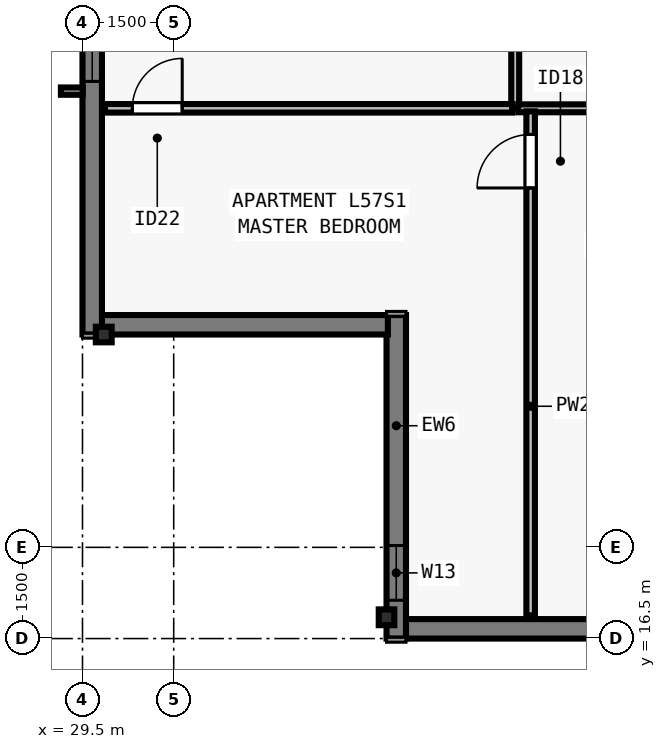
"""IFC4 building model, lengths in metres.
Left out: names, types, materials, properties, quantities, classifications, styles, units other than length and angle.
Written with IfcOpenShell. Run it as: python <this file> out.ifc"""

import sys

from ifc_helpers import new_model, si_unit, direction, frame, frame_2d, origin, origin_2d, place, context, subcontext, project, spatial, rectangle, i_section, extrude, element, fill, save


model = new_model("IFC4")
c1 = context("Model", 3, precision=1e-05, world=origin(), true_north=direction((0.0, 1.0)))
c2 = subcontext(c1, "Body", "Model", "MODEL_VIEW")
j1 = project(units=[si_unit("LENGTHUNIT", "METRE"), si_unit("PLANEANGLEUNIT", "RADIAN")], contexts=[c1])
p1 = place(None, origin())
s1 = spatial("IfcSite", under=j1, at=p1, CompositionType="ELEMENT")
p2 = place(p1, origin())
s2 = spatial("IfcBuilding", under=s1, at=p2, CompositionType="ELEMENT")
p3 = place(p2, frame((0.0, 0.0, 209.5)))
s3 = spatial("IfcBuildingStorey", under=s2, at=p3, CompositionType="ELEMENT", Elevation=209.5)
for number, where, z_axis, x_axis in (
    (1, (34.5, 16.85, 0.0), (0.0, 0.0, 1.0), (1.0, 0.0, 0.0)),
    (2, (29.85, 21.5, 0.0), (0.0, 0.0, 1.0), (0.0, 1.0, 0.0)),
):
    element("IfcColumn", number, at=place(p3, frame(where, z_axis=z_axis, x_axis=x_axis)), inside=s3, PredefinedType="COLUMN", context=c2, shape_type="SweptSolid", body=[
        extrude(i_section(OverallWidth=0.256, OverallDepth=0.26, WebThickness=0.01, FlangeThickness=0.017, FilletRadius=0.013, at=origin_2d()), origin(), (0.0, 0.0, 1.0), 3.5),
    ])
p4 = place(p3, frame((69.5, 16.66, 0.0), z_axis=(0.0, 0.0, 1.0), x_axis=(-1.0, 0.0, 0.0)))
e3 = element("IfcWall", 3, at=p4, inside=s3, PredefinedType="SOLIDWALL", context=c2, shape_type="SweptSolid", body=[
    extrude(rectangle(XDim=34.702, YDim=0.32, at=frame_2d((17.351, 0.0))), origin(), (0.0, 0.0, 1.0), 3.29),
])
p5 = place(p4, frame((5.863, 0.0, 0.8)))
e4 = element("IfcOpeningElement", 4, at=p5, cuts=e3, PredefinedType="OPENING", context=c2, shape_type="SweptSolid", body=[
    extrude(rectangle(XDim=1.85, YDim=1.678, at=frame_2d((0.925, 0.839))), frame((0.0, 0.17, 0.0), z_axis=(0.0, -1.0, 0.0), x_axis=(1.0, 0.0, 0.0)), (0.0, 0.0, 1.0), 0.34),
])
p6 = place(p4, frame((8.138, 0.0, 0.8)))
e5 = element("IfcOpeningElement", 5, at=p6, cuts=e3, PredefinedType="OPENING", context=c2, shape_type="SweptSolid", body=[
    extrude(rectangle(XDim=1.55, YDim=1.678, at=frame_2d((0.775, 0.839))), frame((0.0, 0.17, 0.0), z_axis=(0.0, -1.0, 0.0), x_axis=(1.0, 0.0, 0.0)), (0.0, 0.0, 1.0), 0.34),
])
p7 = place(p4, frame((10.113, 0.0, 0.8)))
e6 = element("IfcOpeningElement", 6, at=p7, cuts=e3, PredefinedType="OPENING", context=c2, shape_type="SweptSolid", body=[
    extrude(rectangle(XDim=1.85, YDim=1.678, at=frame_2d((0.925, 0.839))), frame((0.0, 0.17, 0.0), z_axis=(0.0, -1.0, 0.0), x_axis=(1.0, 0.0, 0.0)), (0.0, 0.0, 1.0), 0.34),
])
p8 = place(p4, frame((14.888, 0.0, 0.8)))
e7 = element("IfcOpeningElement", 7, at=p8, cuts=e3, PredefinedType="OPENING", context=c2, shape_type="SweptSolid", body=[
    extrude(rectangle(XDim=1.55, YDim=1.678, at=frame_2d((0.775, 0.839))), frame((0.0, 0.17, 0.0), z_axis=(0.0, -1.0, 0.0), x_axis=(1.0, 0.0, 0.0)), (0.0, 0.0, 1.0), 0.34),
])
p9 = place(p4, frame((18.564, 0.0, 0.8)))
e8 = element("IfcOpeningElement", 8, at=p9, cuts=e3, PredefinedType="OPENING", context=c2, shape_type="SweptSolid", body=[
    extrude(rectangle(XDim=1.85, YDim=1.678, at=frame_2d((0.925, 0.839))), frame((0.0, 0.17, 0.0), z_axis=(0.0, -1.0, 0.0), x_axis=(1.0, 0.0, 0.0)), (0.0, 0.0, 1.0), 0.34),
])
p10 = place(p4, frame((24.414, 0.0, 0.8)))
e9 = element("IfcOpeningElement", 9, at=p10, cuts=e3, PredefinedType="OPENING", context=c2, shape_type="SweptSolid", body=[
    extrude(rectangle(XDim=1.85, YDim=1.678, at=frame_2d((0.925, 0.839))), frame((0.0, 0.17, 0.0), z_axis=(0.0, -1.0, 0.0), x_axis=(1.0, 0.0, 0.0)), (0.0, 0.0, 1.0), 0.34),
])
p11 = place(p4, frame((28.389, 0.0, 0.8)))
e10 = element("IfcOpeningElement", 10, at=p11, cuts=e3, PredefinedType="OPENING", context=c2, shape_type="SweptSolid", body=[
    extrude(rectangle(XDim=1.55, YDim=1.678, at=frame_2d((0.775, 0.839))), frame((0.0, 0.17, 0.0), z_axis=(0.0, -1.0, 0.0), x_axis=(1.0, 0.0, 0.0)), (0.0, 0.0, 1.0), 0.34),
])
p12 = place(p3, frame((34.66, 16.5, 0.0), z_axis=(0.0, 0.0, 1.0), x_axis=(0.0, 1.0, 0.0)))
e11 = element("IfcWall", 11, at=p12, inside=s3, PredefinedType="SOLIDWALL", context=c2, shape_type="SweptSolid", body=[
    extrude(rectangle(XDim=5.32, YDim=0.32, at=frame_2d((2.66, 0.0))), origin(), (0.0, 0.0, 1.0), 3.29),
])
p13 = place(p12, frame((0.63, 0.0, 0.8)))
e12 = element("IfcOpeningElement", 12, at=p13, cuts=e11, PredefinedType="OPENING", context=c2, shape_type="SweptSolid", body=[
    extrude(rectangle(XDim=0.9, YDim=1.678, at=frame_2d((0.45, 0.839))), frame((0.0, 0.17, 0.0), z_axis=(0.0, -1.0, 0.0), x_axis=(1.0, 0.0, 0.0)), (0.0, 0.0, 1.0), 0.34),
])
p14 = place(p3, frame((34.522, 21.66, 0.0), z_axis=(0.0, 0.0, 1.0), x_axis=(-1.0, 0.0, 0.0)))
e13 = element("IfcWall", 13, at=p14, inside=s3, PredefinedType="SOLIDWALL", context=c2, shape_type="SweptSolid", body=[
    extrude(rectangle(XDim=4.724, YDim=0.32, at=frame_2d((2.362, 0.0))), origin(), (0.0, 0.0, 1.0), 3.29),
])
p15 = place(p3, frame((29.66, 21.5, 0.0), z_axis=(0.0, 0.0, 1.0), x_axis=(0.0, 1.0, 0.0)))
e14 = element("IfcWall", 14, at=p15, inside=s3, PredefinedType="SOLIDWALL", context=c2, shape_type="SweptSolid", body=[
    extrude(rectangle(XDim=34.702, YDim=0.32, at=frame_2d((17.351, 0.0))), origin(), (0.0, 0.0, 1.0), 3.29),
])
p16 = place(p15, frame((4.163, 0.0, 0.8)))
e15 = element("IfcOpeningElement", 15, at=p16, cuts=e14, PredefinedType="OPENING", context=c2, shape_type="SweptSolid", body=[
    extrude(rectangle(XDim=1.85, YDim=1.678, at=frame_2d((0.925, 0.839))), frame((0.0, 0.17, 0.0), z_axis=(0.0, -1.0, 0.0), x_axis=(1.0, 0.0, 0.0)), (0.0, 0.0, 1.0), 0.34),
])
p17 = place(p15, frame((6.888, 0.0, 0.8)))
e16 = element("IfcOpeningElement", 16, at=p17, cuts=e14, PredefinedType="OPENING", context=c2, shape_type="SweptSolid", body=[
    extrude(rectangle(XDim=1.55, YDim=1.678, at=frame_2d((0.775, 0.839))), frame((0.0, 0.17, 0.0), z_axis=(0.0, -1.0, 0.0), x_axis=(1.0, 0.0, 0.0)), (0.0, 0.0, 1.0), 0.34),
])
p18 = place(p15, frame((10.113, 0.0, 0.8)))
e17 = element("IfcOpeningElement", 17, at=p18, cuts=e14, PredefinedType="OPENING", context=c2, shape_type="SweptSolid", body=[
    extrude(rectangle(XDim=1.85, YDim=1.678, at=frame_2d((0.925, 0.839))), frame((0.0, 0.17, 0.0), z_axis=(0.0, -1.0, 0.0), x_axis=(1.0, 0.0, 0.0)), (0.0, 0.0, 1.0), 0.34),
])
p19 = place(p15, frame((14.888, 0.0, 0.8)))
e18 = element("IfcOpeningElement", 18, at=p19, cuts=e14, PredefinedType="OPENING", context=c2, shape_type="SweptSolid", body=[
    extrude(rectangle(XDim=1.55, YDim=1.678, at=frame_2d((0.775, 0.839))), frame((0.0, 0.17, 0.0), z_axis=(0.0, -1.0, 0.0), x_axis=(1.0, 0.0, 0.0)), (0.0, 0.0, 1.0), 0.34),
])
p20 = place(p15, frame((19.364, 0.0, 0.8)))
e19 = element("IfcOpeningElement", 19, at=p20, cuts=e14, PredefinedType="OPENING", context=c2, shape_type="SweptSolid", body=[
    extrude(rectangle(XDim=1.85, YDim=1.678, at=frame_2d((0.925, 0.839))), frame((0.0, 0.17, 0.0), z_axis=(0.0, -1.0, 0.0), x_axis=(1.0, 0.0, 0.0)), (0.0, 0.0, 1.0), 0.34),
])
p21 = place(p15, frame((23.614, 0.0, 0.8)))
e20 = element("IfcOpeningElement", 20, at=p21, cuts=e14, PredefinedType="OPENING", context=c2, shape_type="SweptSolid", body=[
    extrude(rectangle(XDim=1.85, YDim=1.678, at=frame_2d((0.925, 0.839))), frame((0.0, 0.17, 0.0), z_axis=(0.0, -1.0, 0.0), x_axis=(1.0, 0.0, 0.0)), (0.0, 0.0, 1.0), 0.34),
])
p22 = place(p15, frame((28.839, 0.0, 0.8)))
e21 = element("IfcOpeningElement", 21, at=p22, cuts=e14, PredefinedType="OPENING", context=c2, shape_type="SweptSolid", body=[
    extrude(rectangle(XDim=1.55, YDim=1.678, at=frame_2d((0.775, 0.839))), frame((0.0, 0.17, 0.0), z_axis=(0.0, -1.0, 0.0), x_axis=(1.0, 0.0, 0.0)), (0.0, 0.0, 1.0), 0.34),
])
p23 = place(p3, frame((36.616, 25.22, 0.0), z_axis=(0.0, 0.0, 1.0), x_axis=(0.0, 1.0, 0.0)))
e22 = element("IfcWall", 22, at=p23, inside=s3, PredefinedType="PLUMBINGWALL", context=c2, shape_type="SweptSolid", body=[
    extrude(rectangle(XDim=2.75, YDim=0.13, at=frame_2d((1.375, 0.0))), origin(), (0.0, 0.0, 1.0), 3.29),
])
p24 = place(p3, frame((36.666, 25.22, 0.0), z_axis=(0.0, 0.0, 1.0), x_axis=(1.0, 0.0, 0.0)))
e23 = element("IfcWall", 23, at=p24, inside=s3, PredefinedType="PLUMBINGWALL", context=c2, shape_type="SweptSolid", body=[
    extrude(rectangle(XDim=2.85, YDim=0.13, at=frame_2d((1.425, 0.0))), origin(), (0.0, 0.0, 1.0), 3.29),
])
p25 = place(p3, frame((36.87, 16.88, 0.0), z_axis=(0.0, 0.0, 1.0), x_axis=(0.0, 1.0, 0.0)))
e24 = element("IfcWall", 24, at=p25, inside=s3, PredefinedType="PARTITIONING", context=c2, shape_type="SweptSolid", body=[
    extrude(rectangle(XDim=8.29, YDim=0.14, at=frame_2d((4.145, 0.0))), origin(), (0.0, 0.0, 1.0), 2.573),
])
p26 = place(p25, frame((7.03, 0.0, 0.0)))
e25 = element("IfcOpeningElement", 25, at=p26, cuts=e24, PredefinedType="OPENING", context=c2, shape_type="SweptSolid", body=[
    extrude(rectangle(XDim=0.88, YDim=2.1, at=frame_2d((0.44, 1.05))), frame((0.0, 0.08, 0.0), z_axis=(0.0, -1.0, 0.0), x_axis=(1.0, 0.0, 0.0)), (0.0, 0.0, 1.0), 0.16),
])
p27 = place(p3, frame((29.87, 25.22, 0.0), z_axis=(0.0, 0.0, 1.0), x_axis=(1.0, 0.0, 0.0)))
e26 = element("IfcWall", 26, at=p27, inside=s3, PredefinedType="PARTITIONING", context=c2, shape_type="SweptSolid", body=[
    extrude(rectangle(XDim=6.696, YDim=0.14, at=frame_2d((3.348, 0.0))), origin(), (0.0, 0.0, 1.0), 2.958),
])
p28 = place(p27, frame((0.45, 0.0, 0.0)))
e27 = element("IfcOpeningElement", 27, at=p28, cuts=e26, PredefinedType="OPENING", context=c2, shape_type="SweptSolid", body=[
    extrude(rectangle(XDim=0.82, YDim=2.1, at=frame_2d((0.41, 1.05))), frame((0.0, 0.08, 0.0), z_axis=(0.0, -1.0, 0.0), x_axis=(1.0, 0.0, 0.0)), (0.0, 0.0, 1.0), 0.16),
])
p29 = place(p16, origin())
e28 = element("IfcWindow", 28, at=p29, inside=s3, PartitioningType="SINGLE_PANEL", PredefinedType="WINDOW", context=c2, shape_type="SweptSolid", body=[
    extrude(rectangle(XDim=1.85, YDim=1.678, at=frame_2d((0.925, 0.839))), frame((0.0, -0.05, 0.0), z_axis=(0.0, -1.0, 0.0), x_axis=(1.0, 0.0, 0.0)), (0.0, 0.0, 1.0), 0.06),
])
fill(e15, e28)
p30 = place(p13, origin())
e29 = element("IfcWindow", 29, at=p30, inside=s3, PartitioningType="SINGLE_PANEL", PredefinedType="WINDOW", context=c2, shape_type="SweptSolid", body=[
    extrude(rectangle(XDim=0.9, YDim=1.678, at=frame_2d((0.45, 0.839))), frame((0.0, -0.04, 0.0), z_axis=(0.0, -1.0, 0.0), x_axis=(1.0, 0.0, 0.0)), (0.0, 0.0, 1.0), 0.06),
])
fill(e12, e29)
p31 = place(p28, origin())
e30 = element("IfcDoor", 30, at=p31, inside=s3, OperationType="SINGLE_SWING_RIGHT", PredefinedType="DOOR", context=c2, shape_type="SweptSolid", body=[
    extrude(rectangle(XDim=0.82, YDim=2.1, at=frame_2d((0.41, 1.05))), frame((0.0, 0.025, 0.0), z_axis=(0.0, -1.0, 0.0), x_axis=(1.0, 0.0, 0.0)), (0.0, 0.0, 1.0), 0.05),
])
fill(e27, e30)
p32 = place(p26, origin())
e31 = element("IfcDoor", 31, at=p32, inside=s3, OperationType="SINGLE_SWING_LEFT", PredefinedType="DOOR", context=c2, shape_type="SweptSolid", body=[
    extrude(rectangle(XDim=0.88, YDim=2.1, at=frame_2d((0.44, 1.05))), frame((0.0, 0.025, 0.0), z_axis=(0.0, -1.0, 0.0), x_axis=(1.0, 0.0, 0.0)), (0.0, 0.0, 1.0), 0.05),
])
fill(e25, e31)
save(model, sys.argv[1])
